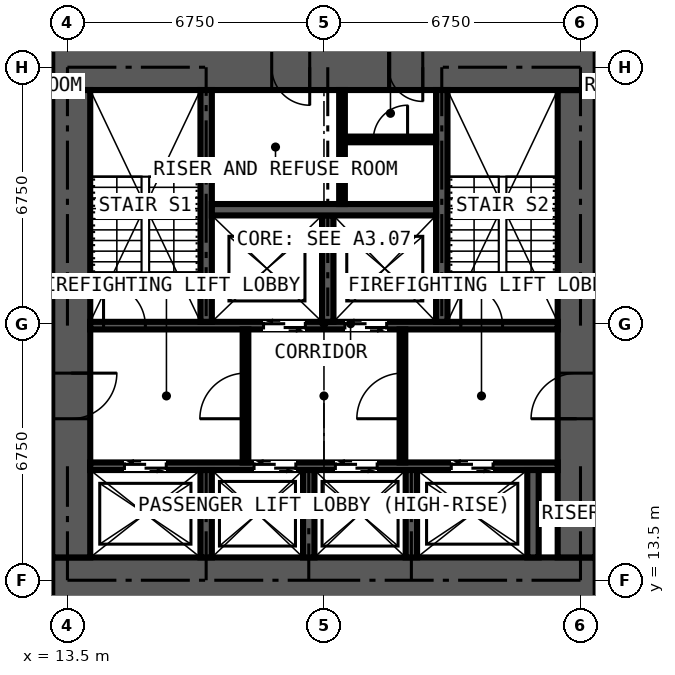
"""IFC4 building model, lengths in metres.
Left out: names, types, materials, properties, quantities, classifications, styles, units other than length and angle.
Written with IfcOpenShell. Run it as: python <this file> out.ifc"""

import sys

from ifc_helpers import new_model, si_unit, direction, frame, frame_2d, origin, place, context, subcontext, project, spatial, rectangle, extrude, element, fill, save


model = new_model("IFC4")
c1 = context("Model", 3, precision=1e-05, world=origin(), true_north=direction((0.0, 1.0)))
c2 = subcontext(c1, "Body", "Model", "MODEL_VIEW")
j1 = project(units=[si_unit("LENGTHUNIT", "METRE"), si_unit("PLANEANGLEUNIT", "RADIAN")], contexts=[c1])
p1 = place(None, origin())
s1 = spatial("IfcSite", under=j1, at=p1, CompositionType="ELEMENT")
p2 = place(p1, origin())
s2 = spatial("IfcBuilding", under=s1, at=p2, CompositionType="ELEMENT")
p3 = place(p2, frame((0.0, 0.0, 163.8)))
s3 = spatial("IfcBuildingStorey", under=s2, at=p3, CompositionType="ELEMENT", Elevation=163.8)
p4 = place(p3, frame((13.1, 13.5, 0.0), z_axis=(0.0, 0.0, 1.0), x_axis=(1.0, 0.0, 0.0)))
e1 = element("IfcWall", 1, at=p4, inside=s3, PredefinedType="SHEAR", context=c2, shape_type="SweptSolid", body=[
    extrude(rectangle(XDim=14.3, YDim=1.2, at=frame_2d((7.15, 0.0))), origin(), (0.0, 0.0, 1.0), 3.6),
])
p5 = place(p3, frame((26.9, 14.1, 0.0), z_axis=(0.0, 0.0, 1.0), x_axis=(0.0, 1.0, 0.0)))
e2 = element("IfcWall", 2, at=p5, inside=s3, PredefinedType="SHEAR", context=c2, shape_type="SweptSolid", body=[
    extrude(rectangle(XDim=12.3, YDim=1.0, at=frame_2d((6.15, 0.0))), origin(), (0.0, 0.0, 1.0), 3.6),
])
p6 = place(p5, frame((3.65, 0.0, 0.0)))
e3 = element("IfcOpeningElement", 3, at=p6, cuts=e2, PredefinedType="OPENING", context=c2, shape_type="SweptSolid", body=[
    extrude(rectangle(XDim=1.2, YDim=2.2, at=frame_2d((0.6, 1.1))), frame((0.0, 0.51, 0.0), z_axis=(0.0, -1.0, 0.0), x_axis=(1.0, 0.0, 0.0)), (0.0, 0.0, 1.0), 1.02),
])
p7 = place(p3, frame((27.4, 27.0, 0.0), z_axis=(0.0, 0.0, 1.0), x_axis=(-1.0, 0.0, 0.0)))
e4 = element("IfcWall", 4, at=p7, inside=s3, PredefinedType="SHEAR", context=c2, shape_type="SweptSolid", body=[
    extrude(rectangle(XDim=14.3, YDim=1.2, at=frame_2d((7.15, 0.0))), origin(), (0.0, 0.0, 1.0), 3.6),
])
p8 = place(p7, frame((4.55, 0.0, 0.0)))
e5 = element("IfcOpeningElement", 5, at=p8, cuts=e4, PredefinedType="OPENING", context=c2, shape_type="SweptSolid", body=[
    extrude(rectangle(XDim=0.9, YDim=2.2, at=frame_2d((0.45, 1.1))), frame((0.0, 0.61, 0.0), z_axis=(0.0, -1.0, 0.0), x_axis=(1.0, 0.0, 0.0)), (0.0, 0.0, 1.0), 1.22),
])
p9 = place(p7, frame((7.525, 0.0, 0.0)))
e6 = element("IfcOpeningElement", 6, at=p9, cuts=e4, PredefinedType="OPENING", context=c2, shape_type="SweptSolid", body=[
    extrude(rectangle(XDim=1.0, YDim=2.2, at=frame_2d((0.5, 1.1))), frame((0.0, 0.61, 0.0), z_axis=(0.0, -1.0, 0.0), x_axis=(1.0, 0.0, 0.0)), (0.0, 0.0, 1.0), 1.22),
])
p10 = place(p3, frame((13.6, 26.4, 0.0), z_axis=(0.0, 0.0, 1.0), x_axis=(0.0, -1.0, 0.0)))
e7 = element("IfcWall", 7, at=p10, inside=s3, PredefinedType="SHEAR", context=c2, shape_type="SweptSolid", body=[
    extrude(rectangle(XDim=12.3, YDim=1.0, at=frame_2d((6.15, 0.0))), origin(), (0.0, 0.0, 1.0), 3.6),
])
p11 = place(p10, frame((7.45, 0.0, 0.0)))
e8 = element("IfcOpeningElement", 8, at=p11, cuts=e7, PredefinedType="OPENING", context=c2, shape_type="SweptSolid", body=[
    extrude(rectangle(XDim=1.2, YDim=2.2, at=frame_2d((0.6, 1.1))), frame((0.0, 0.51, 0.0), z_axis=(0.0, -1.0, 0.0), x_axis=(1.0, 0.0, 0.0)), (0.0, 0.0, 1.0), 1.02),
])
p12 = place(p3, frame((14.1, 16.5, 0.0), z_axis=(0.0, 0.0, 1.0), x_axis=(1.0, 0.0, 0.0)))
e9 = element("IfcWall", 9, at=p12, inside=s3, PredefinedType="SHEAR", context=c2, shape_type="SweptSolid", body=[
    extrude(rectangle(XDim=12.3, YDim=0.2, at=frame_2d((6.15, 0.0))), origin(), (0.0, 0.0, 1.0), 3.6),
])
p13 = place(p12, frame((0.9, 0.0, 0.0)))
e10 = element("IfcOpeningElement", 10, at=p13, cuts=e9, PredefinedType="OPENING", context=c2, shape_type="SweptSolid", body=[
    extrude(rectangle(XDim=1.1, YDim=2.2, at=frame_2d((0.55, 1.1))), frame((0.0, 0.11, 0.0), z_axis=(0.0, -1.0, 0.0), x_axis=(1.0, 0.0, 0.0)), (0.0, 0.0, 1.0), 0.22),
])
p14 = place(p12, frame((4.31, 0.0, 0.0)))
e11 = element("IfcOpeningElement", 11, at=p14, cuts=e9, PredefinedType="OPENING", context=c2, shape_type="SweptSolid", body=[
    extrude(rectangle(XDim=1.1, YDim=2.2, at=frame_2d((0.55, 1.1))), frame((0.0, 0.11, 0.0), z_axis=(0.0, -1.0, 0.0), x_axis=(1.0, 0.0, 0.0)), (0.0, 0.0, 1.0), 0.22),
])
p15 = place(p12, frame((6.45, 0.0, 0.0)))
e12 = element("IfcOpeningElement", 12, at=p15, cuts=e9, PredefinedType="OPENING", context=c2, shape_type="SweptSolid", body=[
    extrude(rectangle(XDim=1.1, YDim=2.2, at=frame_2d((0.55, 1.1))), frame((0.0, 0.11, 0.0), z_axis=(0.0, -1.0, 0.0), x_axis=(1.0, 0.0, 0.0)), (0.0, 0.0, 1.0), 0.22),
])
p16 = place(p12, frame((9.5, 0.0, 0.0)))
e13 = element("IfcOpeningElement", 13, at=p16, cuts=e9, PredefinedType="OPENING", context=c2, shape_type="SweptSolid", body=[
    extrude(rectangle(XDim=1.1, YDim=2.2, at=frame_2d((0.55, 1.1))), frame((0.0, 0.11, 0.0), z_axis=(0.0, -1.0, 0.0), x_axis=(1.0, 0.0, 0.0)), (0.0, 0.0, 1.0), 0.22),
])
p17 = place(p3, frame((14.1, 20.2, 0.0), z_axis=(0.0, 0.0, 1.0), x_axis=(1.0, 0.0, 0.0)))
e14 = element("IfcWall", 14, at=p17, inside=s3, PredefinedType="SHEAR", context=c2, shape_type="SweptSolid", body=[
    extrude(rectangle(XDim=12.3, YDim=0.2, at=frame_2d((6.15, 0.0))), origin(), (0.0, 0.0, 1.0), 3.6),
])
p18 = place(p17, frame((4.56, 0.0, 0.0)))
e15 = element("IfcOpeningElement", 15, at=p18, cuts=e14, PredefinedType="OPENING", context=c2, shape_type="SweptSolid", body=[
    extrude(rectangle(XDim=1.1, YDim=2.2, at=frame_2d((0.55, 1.1))), frame((0.0, 0.11, 0.0), z_axis=(0.0, -1.0, 0.0), x_axis=(1.0, 0.0, 0.0)), (0.0, 0.0, 1.0), 0.22),
])
p19 = place(p17, frame((6.7, 0.0, 0.0)))
e16 = element("IfcOpeningElement", 16, at=p19, cuts=e14, PredefinedType="OPENING", context=c2, shape_type="SweptSolid", body=[
    extrude(rectangle(XDim=1.1, YDim=2.2, at=frame_2d((0.55, 1.1))), frame((0.0, 0.11, 0.0), z_axis=(0.0, -1.0, 0.0), x_axis=(1.0, 0.0, 0.0)), (0.0, 0.0, 1.0), 0.22),
])
p20 = place(p17, frame((0.35, 0.0, 0.0)))
e17 = element("IfcOpeningElement", 17, at=p20, cuts=e14, PredefinedType="OPENING", context=c2, shape_type="SweptSolid", body=[
    extrude(rectangle(XDim=1.1, YDim=2.2, at=frame_2d((0.55, 1.1))), frame((0.0, 0.11, 0.0), z_axis=(0.0, -1.0, 0.0), x_axis=(1.0, 0.0, 0.0)), (0.0, 0.0, 1.0), 0.22),
])
p21 = place(p17, frame((9.75, 0.0, 0.0)))
e18 = element("IfcOpeningElement", 18, at=p21, cuts=e14, PredefinedType="OPENING", context=c2, shape_type="SweptSolid", body=[
    extrude(rectangle(XDim=1.1, YDim=2.2, at=frame_2d((0.55, 1.1))), frame((0.0, 0.11, 0.0), z_axis=(0.0, -1.0, 0.0), x_axis=(1.0, 0.0, 0.0)), (0.0, 0.0, 1.0), 0.22),
])
for number, where, z_axis, x_axis in (
    (19, (17.15, 20.3, 0.0), (0.0, 0.0, 1.0), (0.0, 1.0, 0.0)),
    (20, (23.35, 20.3, 0.0), (0.0, 0.0, 1.0), (0.0, 1.0, 0.0)),
):
    element("IfcWall", number, at=place(p3, frame(where, z_axis=z_axis, x_axis=x_axis)), inside=s3, PredefinedType="SHEAR", context=c2, shape_type="SweptSolid", body=[
        extrude(rectangle(XDim=6.1, YDim=0.3, at=frame_2d((3.05, 0.0))), origin(), (0.0, 0.0, 1.0), 3.6),
    ])
p22 = place(p3, frame((20.35, 20.3, 0.0), z_axis=(0.0, 0.0, 1.0), x_axis=(0.0, 1.0, 0.0)))
e21 = element("IfcWall", 21, at=p22, inside=s3, PredefinedType="SHEAR", context=c2, shape_type="SweptSolid", body=[
    extrude(rectangle(XDim=2.8, YDim=0.3, at=frame_2d((1.4, 0.0))), origin(), (0.0, 0.0, 1.0), 3.6),
])
p23 = place(p3, frame((17.3, 23.25, 0.0), z_axis=(0.0, 0.0, 1.0), x_axis=(1.0, 0.0, 0.0)))
e22 = element("IfcWall", 22, at=p23, inside=s3, PredefinedType="SHEAR", context=c2, shape_type="SweptSolid", body=[
    extrude(rectangle(XDim=5.9, YDim=0.3, at=frame_2d((2.95, 0.0))), origin(), (0.0, 0.0, 1.0), 3.6),
])
for number, where, z_axis, x_axis in (
    (23, (17.15, 14.1, 0.0), (0.0, 0.0, 1.0), (0.0, 1.0, 0.0)),
    (24, (19.85, 14.1, 0.0), (0.0, 0.0, 1.0), (0.0, 1.0, 0.0)),
    (25, (22.55, 14.1, 0.0), (0.0, 0.0, 1.0), (0.0, 1.0, 0.0)),
    (26, (25.75, 14.1, 0.0), (0.0, 0.0, 1.0), (0.0, 1.0, 0.0)),
):
    element("IfcWall", number, at=place(p3, frame(where, z_axis=z_axis, x_axis=x_axis)), inside=s3, PredefinedType="SHEAR", context=c2, shape_type="SweptSolid", body=[
        extrude(rectangle(XDim=2.3, YDim=0.3, at=frame_2d((1.15, 0.0))), origin(), (0.0, 0.0, 1.0), 3.6),
    ])
p24 = place(p3, frame((18.185, 16.6, 0.0), z_axis=(0.0, 0.0, 1.0), x_axis=(0.0, 1.0, 0.0)))
e27 = element("IfcWall", 27, at=p24, inside=s3, PredefinedType="PARTITIONING", context=c2, shape_type="SweptSolid", body=[
    extrude(rectangle(XDim=3.5, YDim=0.15, at=frame_2d((1.75, 0.0))), origin(), (0.0, 0.0, 1.0), 3.375),
])
p25 = place(p24, frame((1.15, 0.0, 0.0)))
e28 = element("IfcOpeningElement", 28, at=p25, cuts=e27, PredefinedType="OPENING", context=c2, shape_type="SweptSolid", body=[
    extrude(rectangle(XDim=1.2, YDim=2.2, at=frame_2d((0.6, 1.1))), frame((0.0, 0.085, 0.0), z_axis=(0.0, -1.0, 0.0), x_axis=(1.0, 0.0, 0.0)), (0.0, 0.0, 1.0), 0.17),
])
p26 = place(p3, frame((22.315, 16.6, 0.0), z_axis=(0.0, 0.0, 1.0), x_axis=(0.0, 1.0, 0.0)))
e29 = element("IfcWall", 29, at=p26, inside=s3, PredefinedType="PARTITIONING", context=c2, shape_type="SweptSolid", body=[
    extrude(rectangle(XDim=3.5, YDim=0.15, at=frame_2d((1.75, 0.0))), origin(), (0.0, 0.0, 1.0), 3.375),
])
p27 = place(p26, frame((1.15, 0.0, 0.0)))
e30 = element("IfcOpeningElement", 30, at=p27, cuts=e29, PredefinedType="OPENING", context=c2, shape_type="SweptSolid", body=[
    extrude(rectangle(XDim=1.2, YDim=2.2, at=frame_2d((0.6, 1.1))), frame((0.0, 0.085, 0.0), z_axis=(0.0, -1.0, 0.0), x_axis=(1.0, 0.0, 0.0)), (0.0, 0.0, 1.0), 0.17),
])
p28 = place(p3, frame((20.725, 23.4, 0.0), z_axis=(0.0, 0.0, 1.0), x_axis=(0.0, 1.0, 0.0)))
e31 = element("IfcWall", 31, at=p28, inside=s3, PredefinedType="PARTITIONING", context=c2, shape_type="SweptSolid", body=[
    extrude(rectangle(XDim=3.0, YDim=0.15, at=frame_2d((1.5, 0.0))), origin(), (0.0, 0.0, 1.0), 3.375),
])
p29 = place(p3, frame((20.8, 25.1, 0.0), z_axis=(0.0, 0.0, 1.0), x_axis=(1.0, 0.0, 0.0)))
e32 = element("IfcWall", 32, at=p29, inside=s3, PredefinedType="PARTITIONING", context=c2, shape_type="SweptSolid", body=[
    extrude(rectangle(XDim=2.4, YDim=0.15, at=frame_2d((1.2, 0.0))), origin(), (0.0, 0.0, 1.0), 3.375),
])
p30 = place(p29, frame((0.75, 0.0, 0.0)))
e33 = element("IfcOpeningElement", 33, at=p30, cuts=e32, PredefinedType="OPENING", context=c2, shape_type="SweptSolid", body=[
    extrude(rectangle(XDim=0.9, YDim=2.2, at=frame_2d((0.45, 1.1))), frame((0.0, 0.085, 0.0), z_axis=(0.0, -1.0, 0.0), x_axis=(1.0, 0.0, 0.0)), (0.0, 0.0, 1.0), 0.17),
])
p31 = place(p13, origin())
e34 = element("IfcDoor", 34, at=p31, inside=s3, OperationType="DOUBLE_DOOR_SLIDING", PredefinedType="DOOR", context=c2, shape_type="SweptSolid", body=[
    extrude(rectangle(XDim=1.1, YDim=2.2, at=frame_2d((0.55, 1.1))), frame((0.0, 0.025, 0.0), z_axis=(0.0, -1.0, 0.0), x_axis=(1.0, 0.0, 0.0)), (0.0, 0.0, 1.0), 0.05),
])
fill(e10, e34)
p32 = place(p14, origin())
e35 = element("IfcDoor", 35, at=p32, inside=s3, OperationType="DOUBLE_DOOR_SLIDING", PredefinedType="DOOR", context=c2, shape_type="SweptSolid", body=[
    extrude(rectangle(XDim=1.1, YDim=2.2, at=frame_2d((0.55, 1.1))), frame((0.0, 0.025, 0.0), z_axis=(0.0, -1.0, 0.0), x_axis=(1.0, 0.0, 0.0)), (0.0, 0.0, 1.0), 0.05),
])
fill(e11, e35)
p33 = place(p15, origin())
e36 = element("IfcDoor", 36, at=p33, inside=s3, OperationType="DOUBLE_DOOR_SLIDING", PredefinedType="DOOR", context=c2, shape_type="SweptSolid", body=[
    extrude(rectangle(XDim=1.1, YDim=2.2, at=frame_2d((0.55, 1.1))), frame((0.0, 0.025, 0.0), z_axis=(0.0, -1.0, 0.0), x_axis=(1.0, 0.0, 0.0)), (0.0, 0.0, 1.0), 0.05),
])
fill(e12, e36)
p34 = place(p16, origin())
e37 = element("IfcDoor", 37, at=p34, inside=s3, OperationType="DOUBLE_DOOR_SLIDING", PredefinedType="DOOR", context=c2, shape_type="SweptSolid", body=[
    extrude(rectangle(XDim=1.1, YDim=2.2, at=frame_2d((0.55, 1.1))), frame((0.0, 0.025, 0.0), z_axis=(0.0, -1.0, 0.0), x_axis=(1.0, 0.0, 0.0)), (0.0, 0.0, 1.0), 0.05),
])
fill(e13, e37)
p35 = place(p18, origin())
e38 = element("IfcDoor", 38, at=p35, inside=s3, OperationType="DOUBLE_DOOR_SLIDING", PredefinedType="DOOR", context=c2, shape_type="SweptSolid", body=[
    extrude(rectangle(XDim=1.1, YDim=2.2, at=frame_2d((0.55, 1.1))), frame((0.0, 0.025, 0.0), z_axis=(0.0, -1.0, 0.0), x_axis=(1.0, 0.0, 0.0)), (0.0, 0.0, 1.0), 0.05),
])
fill(e15, e38)
p36 = place(p19, origin())
e39 = element("IfcDoor", 39, at=p36, inside=s3, OperationType="DOUBLE_DOOR_SLIDING", PredefinedType="DOOR", context=c2, shape_type="SweptSolid", body=[
    extrude(rectangle(XDim=1.1, YDim=2.2, at=frame_2d((0.55, 1.1))), frame((0.0, 0.025, 0.0), z_axis=(0.0, -1.0, 0.0), x_axis=(1.0, 0.0, 0.0)), (0.0, 0.0, 1.0), 0.05),
])
fill(e16, e39)
p37 = place(p11, origin())
e40 = element("IfcDoor", 40, at=p37, inside=s3, OperationType="DOUBLE_DOOR_SINGLE_SWING", PredefinedType="DOOR", context=c2, shape_type="SweptSolid", body=[
    extrude(rectangle(XDim=1.2, YDim=2.2, at=frame_2d((0.6, 1.1))), frame((0.0, 0.025, 0.0), z_axis=(0.0, -1.0, 0.0), x_axis=(1.0, 0.0, 0.0)), (0.0, 0.0, 1.0), 0.05),
])
fill(e8, e40)
p38 = place(p6, origin())
e41 = element("IfcDoor", 41, at=p38, inside=s3, OperationType="DOUBLE_DOOR_SINGLE_SWING", PredefinedType="DOOR", context=c2, shape_type="SweptSolid", body=[
    extrude(rectangle(XDim=1.2, YDim=2.2, at=frame_2d((0.6, 1.1))), frame((0.0, 0.025, 0.0), z_axis=(0.0, -1.0, 0.0), x_axis=(1.0, 0.0, 0.0)), (0.0, 0.0, 1.0), 0.05),
])
fill(e3, e41)
p39 = place(p25, origin())
e42 = element("IfcDoor", 42, at=p39, inside=s3, OperationType="DOUBLE_DOOR_SINGLE_SWING", PredefinedType="DOOR", context=c2, shape_type="SweptSolid", body=[
    extrude(rectangle(XDim=1.2, YDim=2.2, at=frame_2d((0.6, 1.1))), frame((0.0, 0.025, 0.0), z_axis=(0.0, -1.0, 0.0), x_axis=(1.0, 0.0, 0.0)), (0.0, 0.0, 1.0), 0.05),
])
fill(e28, e42)
p40 = place(p27, origin())
e43 = element("IfcDoor", 43, at=p40, inside=s3, OperationType="DOUBLE_DOOR_SINGLE_SWING", PredefinedType="DOOR", context=c2, shape_type="SweptSolid", body=[
    extrude(rectangle(XDim=1.2, YDim=2.2, at=frame_2d((0.6, 1.1))), frame((0.0, 0.025, 0.0), z_axis=(0.0, -1.0, 0.0), x_axis=(1.0, 0.0, 0.0)), (0.0, 0.0, 1.0), 0.05),
])
fill(e30, e43)
p41 = place(p30, origin())
e44 = element("IfcDoor", 44, at=p41, inside=s3, OperationType="SINGLE_SWING_RIGHT", PredefinedType="DOOR", context=c2, shape_type="SweptSolid", body=[
    extrude(rectangle(XDim=0.9, YDim=2.2, at=frame_2d((0.45, 1.1))), frame((0.0, 0.025, 0.0), z_axis=(0.0, -1.0, 0.0), x_axis=(1.0, 0.0, 0.0)), (0.0, 0.0, 1.0), 0.05),
])
fill(e33, e44)
p42 = place(p8, origin())
e45 = element("IfcDoor", 45, at=p42, inside=s3, OperationType="SINGLE_SWING_LEFT", PredefinedType="DOOR", context=c2, shape_type="SweptSolid", body=[
    extrude(rectangle(XDim=0.9, YDim=2.2, at=frame_2d((0.45, 1.1))), frame((0.0, 0.4, 0.0), z_axis=(0.0, -1.0, 0.0), x_axis=(1.0, 0.0, 0.0)), (0.0, 0.0, 1.0), 0.8),
])
fill(e5, e45)
p43 = place(p9, origin())
e46 = element("IfcDoor", 46, at=p43, inside=s3, OperationType="SINGLE_SWING_LEFT", PredefinedType="DOOR", context=c2, shape_type="SweptSolid", body=[
    extrude(rectangle(XDim=1.0, YDim=2.2, at=frame_2d((0.5, 1.1))), frame((0.0, 0.025, 0.0), z_axis=(0.0, -1.0, 0.0), x_axis=(1.0, 0.0, 0.0)), (0.0, 0.0, 1.0), 0.05),
])
fill(e6, e46)
p44 = place(p20, origin())
e47 = element("IfcDoor", 47, at=p44, inside=s3, OperationType="SINGLE_SWING_LEFT", PredefinedType="DOOR", context=c2, shape_type="SweptSolid", body=[
    extrude(rectangle(XDim=1.1, YDim=2.2, at=frame_2d((0.55, 1.1))), frame((0.0, 0.025, 0.0), z_axis=(0.0, -1.0, 0.0), x_axis=(1.0, 0.0, 0.0)), (0.0, 0.0, 1.0), 0.05),
])
fill(e17, e47)
p45 = place(p21, origin())
e48 = element("IfcDoor", 48, at=p45, inside=s3, OperationType="SINGLE_SWING_LEFT", PredefinedType="DOOR", context=c2, shape_type="SweptSolid", body=[
    extrude(rectangle(XDim=1.1, YDim=2.2, at=frame_2d((0.55, 1.1))), frame((0.0, 0.025, 0.0), z_axis=(0.0, -1.0, 0.0), x_axis=(1.0, 0.0, 0.0)), (0.0, 0.0, 1.0), 0.05),
])
fill(e18, e48)
save(model, sys.argv[1])
